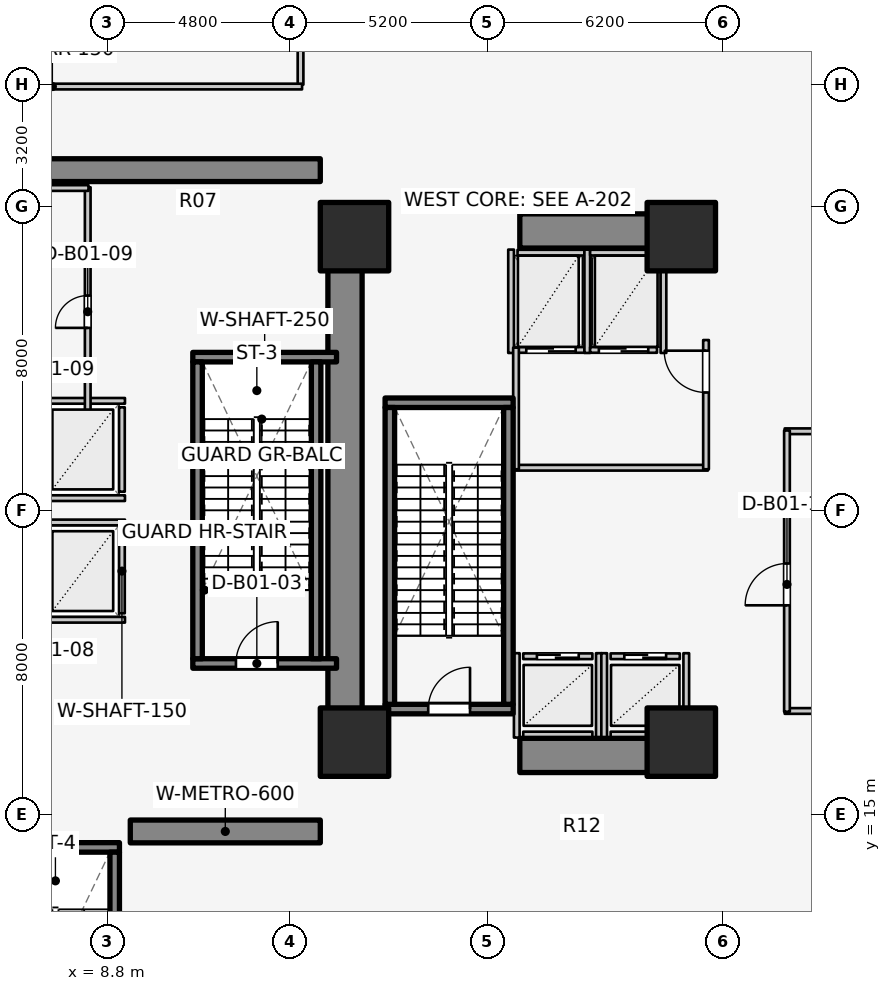
"""IFC4 building model, lengths in metres.
Left out: names, types, materials, properties, quantities, classifications, styles, units other than length and angle.
Written with IfcOpenShell. Run it as: python <this file> out.ifc"""

import sys

from ifc_helpers import new_model, si_unit, direction, frame, frame_2d, origin, origin_2d, place, context, subcontext, project, spatial, rectangle, extrude, element, fill, save


model = new_model("IFC4")
c1 = context("Model", 3, precision=1e-05, world=origin(), true_north=direction((0.0, 1.0)))
c2 = subcontext(c1, "Body", "Model", "MODEL_VIEW")
j1 = project(units=[si_unit("LENGTHUNIT", "METRE"), si_unit("PLANEANGLEUNIT", "RADIAN")], contexts=[c1])
p1 = place(None, origin())
s1 = spatial("IfcSite", under=j1, at=p1, CompositionType="ELEMENT")
p2 = place(p1, origin())
s2 = spatial("IfcBuilding", under=s1, at=p2, CompositionType="ELEMENT")
p3 = place(p2, frame((0.0, 0.0, -5.4)))
s3 = spatial("IfcBuildingStorey", under=s2, at=p3, CompositionType="ELEMENT", Elevation=-5.4)
p4 = place(p3, frame((9.4, 14.55, 0.0), z_axis=(0.0, 0.0, 1.0), x_axis=(1.0, 0.0, 0.0)))
e1 = element("IfcWall", 1, at=p4, inside=s3, PredefinedType="SOLIDWALL", context=c2, shape_type="SweptSolid", body=[
    extrude(rectangle(XDim=5.0, YDim=0.6, at=frame_2d((2.5, 0.0))), origin(), (0.0, 0.0, 1.0), 5.4),
])
p5 = place(p3, frame((6.6, 31.95, 0.0), z_axis=(0.0, 0.0, 1.0), x_axis=(1.0, 0.0, 0.0)))
e2 = element("IfcWall", 2, at=p5, inside=s3, PredefinedType="SOLIDWALL", context=c2, shape_type="SweptSolid", body=[
    extrude(rectangle(XDim=7.8, YDim=0.6, at=frame_2d((3.9, 0.0))), origin(), (0.0, 0.0, 1.0), 5.4),
])
p6 = place(p3, frame((15.05, 17.05, 0.0), z_axis=(0.0, 0.0, 1.0), x_axis=(0.0, 1.0, 0.0)))
e3 = element("IfcWall", 3, at=p6, inside=s3, PredefinedType="SHEAR", context=c2, shape_type="SweptSolid", body=[
    extrude(rectangle(XDim=12.8, YDim=0.9, at=frame_2d((6.4, 0.0))), origin(), (0.0, 0.0, 1.0), 5.4),
])
for number, where, z_axis, x_axis in (
    (4, (19.65, 16.55, 0.0), (0.0, 0.0, 1.0), (1.0, 0.0, 0.0)),
    (5, (19.65, 30.35, 0.0), (0.0, 0.0, 1.0), (1.0, 0.0, 0.0)),
):
    element("IfcWall", number, at=place(p3, frame(where, z_axis=z_axis, x_axis=x_axis)), inside=s3, PredefinedType="SHEAR", context=c2, shape_type="SweptSolid", body=[
        extrude(rectangle(XDim=4.5, YDim=0.9, at=frame_2d((2.25, 0.0))), origin(), (0.0, 0.0, 1.0), 5.4),
    ])
p7 = place(p3, frame((16.105, 17.77, 0.0), z_axis=(0.0, 0.0, 1.0), x_axis=(1.0, 0.0, 0.0)))
e6 = element("IfcWall", 6, at=p7, inside=s3, PredefinedType="SOLIDWALL", context=c2, shape_type="SweptSolid", body=[
    extrude(rectangle(XDim=3.37, YDim=0.25, at=frame_2d((1.685, 0.0))), origin(), (0.0, 0.0, 1.0), 5.4),
])
p8 = place(p7, frame((1.135, 0.0, 0.0)))
e7 = element("IfcOpeningElement", 7, at=p8, cuts=e6, PredefinedType="OPENING", context=c2, shape_type="SweptSolid", body=[
    extrude(rectangle(XDim=1.1, YDim=2.1, at=frame_2d((0.55, 1.05))), frame((0.0, 0.135, 0.0), z_axis=(0.0, -1.0, 0.0), x_axis=(1.0, 0.0, 0.0)), (0.0, 0.0, 1.0), 0.27),
])
p9 = place(p3, frame((16.105, 25.83, 0.0), z_axis=(0.0, 0.0, 1.0), x_axis=(1.0, 0.0, 0.0)))
e8 = element("IfcWall", 8, at=p9, inside=s3, PredefinedType="SOLIDWALL", context=c2, shape_type="SweptSolid", body=[
    extrude(rectangle(XDim=3.37, YDim=0.25, at=frame_2d((1.685, 0.0))), origin(), (0.0, 0.0, 1.0), 5.4),
])
for number, where, z_axis, x_axis in (
    (9, (16.23, 17.895, 0.0), (0.0, 0.0, 1.0), (0.0, 1.0, 0.0)),
    (10, (19.35, 17.895, 0.0), (0.0, 0.0, 1.0), (0.0, 1.0, 0.0)),
):
    element("IfcWall", number, at=place(p3, frame(where, z_axis=z_axis, x_axis=x_axis)), inside=s3, PredefinedType="SOLIDWALL", context=c2, shape_type="SweptSolid", body=[
        extrude(rectangle(XDim=7.81, YDim=0.25, at=frame_2d((3.905, 0.0))), origin(), (0.0, 0.0, 1.0), 5.4),
    ])
p10 = place(p3, frame((11.045, 18.97, 0.0), z_axis=(0.0, 0.0, 1.0), x_axis=(1.0, 0.0, 0.0)))
e11 = element("IfcWall", 11, at=p10, inside=s3, PredefinedType="SOLIDWALL", context=c2, shape_type="SweptSolid", body=[
    extrude(rectangle(XDim=3.782, YDim=0.25, at=frame_2d((1.891, 0.0))), origin(), (0.0, 0.0, 1.0), 5.4),
])
p11 = place(p10, frame((1.135, 0.0, 0.0)))
e12 = element("IfcOpeningElement", 12, at=p11, cuts=e11, PredefinedType="OPENING", context=c2, shape_type="SweptSolid", body=[
    extrude(rectangle(XDim=1.1, YDim=2.1, at=frame_2d((0.55, 1.05))), frame((0.0, 0.135, 0.0), z_axis=(0.0, -1.0, 0.0), x_axis=(1.0, 0.0, 0.0)), (0.0, 0.0, 1.0), 0.27),
])
p12 = place(p3, frame((11.045, 27.03, 0.0), z_axis=(0.0, 0.0, 1.0), x_axis=(1.0, 0.0, 0.0)))
e13 = element("IfcWall", 13, at=p12, inside=s3, PredefinedType="SOLIDWALL", context=c2, shape_type="SweptSolid", body=[
    extrude(rectangle(XDim=3.782, YDim=0.25, at=frame_2d((1.891, 0.0))), origin(), (0.0, 0.0, 1.0), 5.4),
])
for number, where, z_axis, x_axis in (
    (14, (11.17, 19.095, 0.0), (0.0, 0.0, 1.0), (0.0, 1.0, 0.0)),
    (15, (14.29, 19.095, 0.0), (0.0, 0.0, 1.0), (0.0, 1.0, 0.0)),
):
    element("IfcWall", number, at=place(p3, frame(where, z_axis=z_axis, x_axis=x_axis)), inside=s3, PredefinedType="SOLIDWALL", context=c2, shape_type="SweptSolid", body=[
        extrude(rectangle(XDim=7.81, YDim=0.25, at=frame_2d((3.905, 0.0))), origin(), (0.0, 0.0, 1.0), 5.4),
    ])
p13 = place(p3, frame((5.745, 14.13, 0.0), z_axis=(0.0, 0.0, 1.0), x_axis=(1.0, 0.0, 0.0)))
e16 = element("IfcWall", 16, at=p13, inside=s3, PredefinedType="SOLIDWALL", context=c2, shape_type="SweptSolid", body=[
    extrude(rectangle(XDim=3.37, YDim=0.25, at=frame_2d((1.685, 0.0))), origin(), (0.0, 0.0, 1.0), 5.4),
])
p14 = place(p3, frame((8.99, 6.195, 0.0), z_axis=(0.0, 0.0, 1.0), x_axis=(0.0, 1.0, 0.0)))
e17 = element("IfcWall", 17, at=p14, inside=s3, PredefinedType="SOLIDWALL", context=c2, shape_type="SweptSolid", body=[
    extrude(rectangle(XDim=7.81, YDim=0.25, at=frame_2d((3.905, 0.0))), origin(), (0.0, 0.0, 1.0), 5.4),
])
for number, where, z_axis, x_axis in (
    (18, (15.3, 16.9, 0.0), (0.0, 0.0, 1.0), (1.0, 0.0, 0.0)),
    (19, (23.9, 16.9, 0.0), (0.0, 0.0, 1.0), (1.0, 0.0, 0.0)),
    (20, (23.9, 30.2, 0.0), (0.0, 0.0, 1.0), (1.0, 0.0, 0.0)),
    (21, (15.3, 30.2, 0.0), (0.0, 0.0, 1.0), (1.0, 0.0, 0.0)),
):
    element("IfcColumn", number, at=place(p3, frame(where, z_axis=z_axis, x_axis=x_axis)), inside=s3, PredefinedType="COLUMN", context=c2, shape_type="SweptSolid", body=[
        extrude(rectangle(XDim=1.8, YDim=1.8, at=origin_2d()), origin(), (0.0, 0.0, 1.0), 5.4),
    ])
p15 = place(p3, frame((19.74, 19.16, 0.0), z_axis=(0.0, 0.0, 1.0), x_axis=(1.0, 0.0, 0.0)))
e22 = element("IfcWall", 22, at=p15, inside=s3, PredefinedType="SOLIDWALL", context=c2, shape_type="SweptSolid", body=[
    extrude(rectangle(XDim=1.82, YDim=0.15, at=frame_2d((0.91, 0.0))), origin(), (0.0, 0.0, 1.0), 5.055),
])
p16 = place(p15, frame((0.36, 0.0, 0.0)))
e23 = element("IfcOpeningElement", 23, at=p16, cuts=e22, PredefinedType="OPENING", context=c2, shape_type="SweptSolid", body=[
    extrude(rectangle(XDim=1.1, YDim=2.1, at=frame_2d((0.55, 1.05))), frame((0.0, 0.085, 0.0), z_axis=(0.0, -1.0, 0.0), x_axis=(1.0, 0.0, 0.0)), (0.0, 0.0, 1.0), 0.17),
])
p17 = place(p3, frame((19.74, 17.1, 0.0), z_axis=(0.0, 0.0, 1.0), x_axis=(1.0, 0.0, 0.0)))
e24 = element("IfcWall", 24, at=p17, inside=s3, PredefinedType="SOLIDWALL", context=c2, shape_type="SweptSolid", body=[
    extrude(rectangle(XDim=1.82, YDim=0.15, at=frame_2d((0.91, 0.0))), origin(), (0.0, 0.0, 1.0), 5.055),
])
p18 = place(p3, frame((19.57, 17.02, 0.0), z_axis=(0.0, 0.0, 1.0), x_axis=(0.0, 1.0, 0.0)))
e25 = element("IfcWall", 25, at=p18, inside=s3, PredefinedType="SOLIDWALL", context=c2, shape_type="SweptSolid", body=[
    extrude(rectangle(XDim=2.22, YDim=0.15, at=frame_2d((1.11, 0.0))), origin(), (0.0, 0.0, 1.0), 4.42),
])
p19 = place(p3, frame((21.73, 17.02, 0.0), z_axis=(0.0, 0.0, 1.0), x_axis=(0.0, 1.0, 0.0)))
e26 = element("IfcWall", 26, at=p19, inside=s3, PredefinedType="SOLIDWALL", context=c2, shape_type="SweptSolid", body=[
    extrude(rectangle(XDim=2.22, YDim=0.15, at=frame_2d((1.11, 0.0))), origin(), (0.0, 0.0, 1.0), 5.055),
])
p20 = place(p3, frame((22.04, 19.16, 0.0), z_axis=(0.0, 0.0, 1.0), x_axis=(1.0, 0.0, 0.0)))
e27 = element("IfcWall", 27, at=p20, inside=s3, PredefinedType="SOLIDWALL", context=c2, shape_type="SweptSolid", body=[
    extrude(rectangle(XDim=1.82, YDim=0.15, at=frame_2d((0.91, 0.0))), origin(), (0.0, 0.0, 1.0), 4.42),
])
p21 = place(p20, frame((0.36, 0.0, 0.0)))
e28 = element("IfcOpeningElement", 28, at=p21, cuts=e27, PredefinedType="OPENING", context=c2, shape_type="SweptSolid", body=[
    extrude(rectangle(XDim=1.1, YDim=2.1, at=frame_2d((0.55, 1.05))), frame((0.0, 0.085, 0.0), z_axis=(0.0, -1.0, 0.0), x_axis=(1.0, 0.0, 0.0)), (0.0, 0.0, 1.0), 0.17),
])
p22 = place(p3, frame((22.04, 17.1, 0.0), z_axis=(0.0, 0.0, 1.0), x_axis=(1.0, 0.0, 0.0)))
e29 = element("IfcWall", 29, at=p22, inside=s3, PredefinedType="SOLIDWALL", context=c2, shape_type="SweptSolid", body=[
    extrude(rectangle(XDim=1.82, YDim=0.15, at=frame_2d((0.91, 0.0))), origin(), (0.0, 0.0, 1.0), 4.42),
])
p23 = place(p3, frame((21.87, 17.02, 0.0), z_axis=(0.0, 0.0, 1.0), x_axis=(0.0, 1.0, 0.0)))
e30 = element("IfcWall", 30, at=p23, inside=s3, PredefinedType="SOLIDWALL", context=c2, shape_type="SweptSolid", body=[
    extrude(rectangle(XDim=2.22, YDim=0.15, at=frame_2d((1.11, 0.0))), origin(), (0.0, 0.0, 1.0), 5.055),
])
p24 = place(p3, frame((24.03, 17.02, 0.0), z_axis=(0.0, 0.0, 1.0), x_axis=(0.0, 1.0, 0.0)))
e31 = element("IfcWall", 31, at=p24, inside=s3, PredefinedType="SOLIDWALL", context=c2, shape_type="SweptSolid", body=[
    extrude(rectangle(XDim=2.22, YDim=0.15, at=frame_2d((1.11, 0.0))), origin(), (0.0, 0.0, 1.0), 4.1),
])
p25 = place(p3, frame((19.59, 27.22, 0.0), z_axis=(0.0, 0.0, 1.0), x_axis=(1.0, 0.0, 0.0)))
e32 = element("IfcWall", 32, at=p25, inside=s3, PredefinedType="SOLIDWALL", context=c2, shape_type="SweptSolid", body=[
    extrude(rectangle(XDim=1.76, YDim=0.15, at=frame_2d((0.88, 0.0))), origin(), (0.0, 0.0, 1.0), 5.055),
])
p26 = place(p25, frame((0.23, 0.0, 0.0)))
e33 = element("IfcOpeningElement", 33, at=p26, cuts=e32, PredefinedType="OPENING", context=c2, shape_type="SweptSolid", body=[
    extrude(rectangle(XDim=1.3, YDim=2.1, at=frame_2d((0.65, 1.05))), frame((0.0, 0.085, 0.0), z_axis=(0.0, -1.0, 0.0), x_axis=(1.0, 0.0, 0.0)), (0.0, 0.0, 1.0), 0.17),
])
p27 = place(p3, frame((19.59, 29.78, 0.0), z_axis=(0.0, 0.0, 1.0), x_axis=(1.0, 0.0, 0.0)))
e34 = element("IfcWall", 34, at=p27, inside=s3, PredefinedType="SOLIDWALL", context=c2, shape_type="SweptSolid", body=[
    extrude(rectangle(XDim=1.76, YDim=0.15, at=frame_2d((0.88, 0.0))), origin(), (0.0, 0.0, 1.0), 5.055),
])
for number, where, z_axis, x_axis in (
    (35, (19.42, 27.14, 0.0), (0.0, 0.0, 1.0), (0.0, 1.0, 0.0)),
    (36, (21.425, 27.14, 0.0), (0.0, 0.0, 1.0), (0.0, 1.0, 0.0)),
):
    element("IfcWall", number, at=place(p3, frame(where, z_axis=z_axis, x_axis=x_axis)), inside=s3, PredefinedType="SOLIDWALL", context=c2, shape_type="SweptSolid", body=[
        extrude(rectangle(XDim=2.72, YDim=0.15, at=frame_2d((1.36, 0.0))), origin(), (0.0, 0.0, 1.0), 5.055),
    ])
p28 = place(p3, frame((21.5, 27.22, 0.0), z_axis=(0.0, 0.0, 1.0), x_axis=(1.0, 0.0, 0.0)))
e37 = element("IfcWall", 37, at=p28, inside=s3, PredefinedType="SOLIDWALL", context=c2, shape_type="SweptSolid", body=[
    extrude(rectangle(XDim=1.76, YDim=0.15, at=frame_2d((0.88, 0.0))), origin(), (0.0, 0.0, 1.0), 5.055),
])
p29 = place(p28, frame((0.23, 0.0, 0.0)))
e38 = element("IfcOpeningElement", 38, at=p29, cuts=e37, PredefinedType="OPENING", context=c2, shape_type="SweptSolid", body=[
    extrude(rectangle(XDim=1.3, YDim=2.1, at=frame_2d((0.65, 1.05))), frame((0.0, 0.085, 0.0), z_axis=(0.0, -1.0, 0.0), x_axis=(1.0, 0.0, 0.0)), (0.0, 0.0, 1.0), 0.17),
])
p30 = place(p3, frame((21.5, 29.78, 0.0), z_axis=(0.0, 0.0, 1.0), x_axis=(1.0, 0.0, 0.0)))
e39 = element("IfcWall", 39, at=p30, inside=s3, PredefinedType="SOLIDWALL", context=c2, shape_type="SweptSolid", body=[
    extrude(rectangle(XDim=1.76, YDim=0.15, at=frame_2d((0.88, 0.0))), origin(), (0.0, 0.0, 1.0), 5.055),
])
p31 = place(p3, frame((23.43, 27.14, 0.0), z_axis=(0.0, 0.0, 1.0), x_axis=(0.0, 1.0, 0.0)))
e40 = element("IfcWall", 40, at=p31, inside=s3, PredefinedType="SOLIDWALL", context=c2, shape_type="SweptSolid", body=[
    extrude(rectangle(XDim=2.72, YDim=0.15, at=frame_2d((1.36, 0.0))), origin(), (0.0, 0.0, 1.0), 5.055),
])
for number, where, z_axis, x_axis in (
    (41, (9.18, 20.29, 0.0), (0.0, 0.0, 1.0), (0.0, 1.0, 0.0)),
    (42, (7.04, 20.12, 0.0), (0.0, 0.0, 1.0), (1.0, 0.0, 0.0)),
    (43, (7.04, 22.68, 0.0), (0.0, 0.0, 1.0), (1.0, 0.0, 0.0)),
    (44, (9.18, 23.49, 0.0), (0.0, 0.0, 1.0), (0.0, 1.0, 0.0)),
    (45, (7.04, 23.32, 0.0), (0.0, 0.0, 1.0), (1.0, 0.0, 0.0)),
    (46, (7.04, 25.88, 0.0), (0.0, 0.0, 1.0), (1.0, 0.0, 0.0)),
):
    element("IfcWall", number, at=place(p3, frame(where, z_axis=z_axis, x_axis=x_axis)), inside=s3, PredefinedType="SOLIDWALL", context=c2, shape_type="SweptSolid", body=[
        extrude(rectangle(XDim=2.22, YDim=0.15, at=frame_2d((1.11, 0.0))), origin(), (0.0, 0.0, 1.0), 5.055),
    ])
p32 = place(p3, frame((19.52, 24.12, 0.0), z_axis=(0.0, 0.0, 1.0), x_axis=(1.0, 0.0, 0.0)))
e47 = element("IfcWall", 47, at=p32, inside=s3, PredefinedType="PARTITIONING", context=c2, shape_type="SweptSolid", body=[
    extrude(rectangle(XDim=5.08, YDim=0.15, at=frame_2d((2.54, 0.0))), origin(), (0.0, 0.0, 1.0), 4.42),
])
p33 = place(p3, frame((19.55, 24.08, 0.0), z_axis=(0.0, 0.0, 1.0), x_axis=(0.0, 1.0, 0.0)))
e48 = element("IfcWall", 48, at=p33, inside=s3, PredefinedType="PARTITIONING", context=c2, shape_type="SweptSolid", body=[
    extrude(rectangle(XDim=3.2, YDim=0.15, at=frame_2d((1.6, 0.0))), origin(), (0.0, 0.0, 1.0), 5.055),
])
p34 = place(p3, frame((24.55, 24.08, 0.0), z_axis=(0.0, 0.0, 1.0), x_axis=(0.0, 1.0, 0.0)))
e49 = element("IfcWall", 49, at=p34, inside=s3, PredefinedType="PARTITIONING", context=c2, shape_type="SweptSolid", body=[
    extrude(rectangle(XDim=3.4, YDim=0.15, at=frame_2d((1.7, 0.0))), origin(), (0.0, 0.0, 1.0), 5.055),
])
p35 = place(p34, frame((2.02, 0.0, 0.0)))
e50 = element("IfcOpeningElement", 50, at=p35, cuts=e49, PredefinedType="OPENING", context=c2, shape_type="SweptSolid", body=[
    extrude(rectangle(XDim=1.1, YDim=2.1, at=frame_2d((0.55, 1.05))), frame((0.0, 0.085, 0.0), z_axis=(0.0, -1.0, 0.0), x_axis=(1.0, 0.0, 0.0)), (0.0, 0.0, 1.0), 0.17),
])
p36 = place(p3, frame((13.88, 34.2, 0.0), z_axis=(0.0, 0.0, 1.0), x_axis=(0.0, 1.0, 0.0)))
e51 = element("IfcWall", 51, at=p36, inside=s3, PredefinedType="PARTITIONING", context=c2, shape_type="SweptSolid", body=[
    extrude(rectangle(XDim=11.02, YDim=0.15, at=frame_2d((5.51, 0.0))), origin(), (0.0, 0.0, 1.0), 4.1),
])
p37 = place(p36, frame((2.082, 0.0, 0.0)))
e52 = element("IfcOpeningElement", 52, at=p37, cuts=e51, PredefinedType="OPENING", context=c2, shape_type="SweptSolid", body=[
    extrude(rectangle(XDim=0.85, YDim=2.05, at=frame_2d((0.425, 1.025))), frame((0.0, 0.085, 0.0), z_axis=(0.0, -1.0, 0.0), x_axis=(1.0, 0.0, 0.0)), (0.0, 0.0, 1.0), 0.17),
])
p38 = place(p3, frame((0.78, 34.15, 0.0), z_axis=(0.0, 0.0, 1.0), x_axis=(1.0, 0.0, 0.0)))
e53 = element("IfcWall", 53, at=p38, inside=s3, PredefinedType="PARTITIONING", context=c2, shape_type="SweptSolid", body=[
    extrude(rectangle(XDim=13.14, YDim=0.15, at=frame_2d((6.57, 0.0))), origin(), (0.0, 0.0, 1.0), 4.1),
])
p39 = place(p3, frame((8.28, 25.3, 0.0), z_axis=(0.0, 0.0, 1.0), x_axis=(0.0, 1.0, 0.0)))
e54 = element("IfcWall", 54, at=p39, inside=s3, PredefinedType="PARTITIONING", context=c2, shape_type="SweptSolid", body=[
    extrude(rectangle(XDim=6.2, YDim=0.15, at=frame_2d((3.1, 0.0))), origin(), (0.0, 0.0, 1.0), 5.055),
])
p40 = place(p39, frame((2.5, 0.0, 0.0)))
e55 = element("IfcOpeningElement", 55, at=p40, cuts=e54, PredefinedType="OPENING", context=c2, shape_type="SweptSolid", body=[
    extrude(rectangle(XDim=0.85, YDim=2.05, at=frame_2d((0.425, 1.025))), frame((0.0, 0.085, 0.0), z_axis=(0.0, -1.0, 0.0), x_axis=(1.0, 0.0, 0.0)), (0.0, 0.0, 1.0), 0.17),
])
for number, where, z_axis, x_axis in (
    (56, (0.78, 25.32, 0.0), (0.0, 0.0, 1.0), (1.0, 0.0, 0.0)),
    (57, (0.78, 31.48, 0.0), (0.0, 0.0, 1.0), (1.0, 0.0, 0.0)),
):
    element("IfcWall", number, at=place(p3, frame(where, z_axis=z_axis, x_axis=x_axis)), inside=s3, PredefinedType="PARTITIONING", context=c2, shape_type="SweptSolid", body=[
        extrude(rectangle(XDim=7.52, YDim=0.15, at=frame_2d((3.76, 0.0))), origin(), (0.0, 0.0, 1.0), 4.1),
    ])
for number, where, z_axis, x_axis in (
    (58, (26.62, 17.72, 0.0), (0.0, 0.0, 1.0), (1.0, 0.0, 0.0)),
    (59, (26.62, 25.08, 0.0), (0.0, 0.0, 1.0), (1.0, 0.0, 0.0)),
):
    element("IfcWall", number, at=place(p3, frame(where, z_axis=z_axis, x_axis=x_axis)), inside=s3, PredefinedType="PARTITIONING", context=c2, shape_type="SweptSolid", body=[
        extrude(rectangle(XDim=10.76, YDim=0.15, at=frame_2d((5.38, 0.0))), origin(), (0.0, 0.0, 1.0), 5.055),
    ])
p41 = place(p3, frame((26.68, 17.7, 0.0), z_axis=(0.0, 0.0, 1.0), x_axis=(0.0, 1.0, 0.0)))
e60 = element("IfcWall", 60, at=p41, inside=s3, PredefinedType="PARTITIONING", context=c2, shape_type="SweptSolid", body=[
    extrude(rectangle(XDim=7.4, YDim=0.15, at=frame_2d((3.7, 0.0))), origin(), (0.0, 0.0, 1.0), 5.055),
])
p42 = place(p41, frame((2.8, 0.0, 0.0)))
e61 = element("IfcOpeningElement", 61, at=p42, cuts=e60, PredefinedType="OPENING", context=c2, shape_type="SweptSolid", body=[
    extrude(rectangle(XDim=1.1, YDim=2.1, at=frame_2d((0.55, 1.05))), frame((0.0, 0.085, 0.0), z_axis=(0.0, -1.0, 0.0), x_axis=(1.0, 0.0, 0.0)), (0.0, 0.0, 1.0), 0.17),
])
p43 = place(p8, origin())
e62 = element("IfcDoor", 62, at=p43, inside=s3, OperationType="SINGLE_SWING_RIGHT", PredefinedType="DOOR", context=c2, shape_type="SweptSolid", body=[
    extrude(rectangle(XDim=1.1, YDim=2.1, at=frame_2d((0.55, 1.05))), frame((0.0, 0.025, 0.0), z_axis=(0.0, -1.0, 0.0), x_axis=(1.0, 0.0, 0.0)), (0.0, 0.0, 1.0), 0.05),
])
fill(e7, e62)
p44 = place(p11, origin())
e63 = element("IfcDoor", 63, at=p44, inside=s3, OperationType="SINGLE_SWING_RIGHT", PredefinedType="DOOR", context=c2, shape_type="SweptSolid", body=[
    extrude(rectangle(XDim=1.1, YDim=2.1, at=frame_2d((0.55, 1.05))), frame((0.0, 0.025, 0.0), z_axis=(0.0, -1.0, 0.0), x_axis=(1.0, 0.0, 0.0)), (0.0, 0.0, 1.0), 0.05),
])
fill(e12, e63)
p45 = place(p16, origin())
e64 = element("IfcDoor", 64, at=p45, inside=s3, OperationType="DOUBLE_DOOR_SLIDING", PredefinedType="DOOR", context=c2, shape_type="SweptSolid", body=[
    extrude(rectangle(XDim=1.1, YDim=2.1, at=frame_2d((0.55, 1.05))), frame((0.0, 0.025, 0.0), z_axis=(0.0, -1.0, 0.0), x_axis=(1.0, 0.0, 0.0)), (0.0, 0.0, 1.0), 0.05),
])
fill(e23, e64)
p46 = place(p21, origin())
e65 = element("IfcDoor", 65, at=p46, inside=s3, OperationType="DOUBLE_DOOR_SLIDING", PredefinedType="DOOR", context=c2, shape_type="SweptSolid", body=[
    extrude(rectangle(XDim=1.1, YDim=2.1, at=frame_2d((0.55, 1.05))), frame((0.0, 0.025, 0.0), z_axis=(0.0, -1.0, 0.0), x_axis=(1.0, 0.0, 0.0)), (0.0, 0.0, 1.0), 0.05),
])
fill(e28, e65)
p47 = place(p26, origin())
e66 = element("IfcDoor", 66, at=p47, inside=s3, OperationType="DOUBLE_DOOR_SLIDING", PredefinedType="DOOR", context=c2, shape_type="SweptSolid", body=[
    extrude(rectangle(XDim=1.3, YDim=2.1, at=frame_2d((0.65, 1.05))), frame((0.0, 0.025, 0.0), z_axis=(0.0, -1.0, 0.0), x_axis=(1.0, 0.0, 0.0)), (0.0, 0.0, 1.0), 0.05),
])
fill(e33, e66)
p48 = place(p29, origin())
e67 = element("IfcDoor", 67, at=p48, inside=s3, OperationType="DOUBLE_DOOR_SLIDING", PredefinedType="DOOR", context=c2, shape_type="SweptSolid", body=[
    extrude(rectangle(XDim=1.3, YDim=2.1, at=frame_2d((0.65, 1.05))), frame((0.0, 0.025, 0.0), z_axis=(0.0, -1.0, 0.0), x_axis=(1.0, 0.0, 0.0)), (0.0, 0.0, 1.0), 0.05),
])
fill(e38, e67)
p49 = place(p35, origin())
e68 = element("IfcDoor", 68, at=p49, inside=s3, OperationType="SINGLE_SWING_RIGHT", PredefinedType="DOOR", context=c2, shape_type="SweptSolid", body=[
    extrude(rectangle(XDim=1.1, YDim=2.1, at=frame_2d((0.55, 1.05))), frame((0.0, 0.025, 0.0), z_axis=(0.0, -1.0, 0.0), x_axis=(1.0, 0.0, 0.0)), (0.0, 0.0, 1.0), 0.05),
])
fill(e50, e68)
p50 = place(p40, origin())
e69 = element("IfcDoor", 69, at=p50, inside=s3, OperationType="SINGLE_SWING_LEFT", PredefinedType="DOOR", context=c2, shape_type="SweptSolid", body=[
    extrude(rectangle(XDim=0.85, YDim=2.05, at=frame_2d((0.425, 1.025))), frame((0.0, 0.025, 0.0), z_axis=(0.0, -1.0, 0.0), x_axis=(1.0, 0.0, 0.0)), (0.0, 0.0, 1.0), 0.05),
])
fill(e55, e69)
p51 = place(p42, origin())
e70 = element("IfcDoor", 70, at=p51, inside=s3, OperationType="SINGLE_SWING_LEFT", PredefinedType="DOOR", context=c2, shape_type="SweptSolid", body=[
    extrude(rectangle(XDim=1.1, YDim=2.1, at=frame_2d((0.55, 1.05))), frame((0.0, 0.025, 0.0), z_axis=(0.0, -1.0, 0.0), x_axis=(1.0, 0.0, 0.0)), (0.0, 0.0, 1.0), 0.05),
])
fill(e61, e70)
save(model, sys.argv[1])
